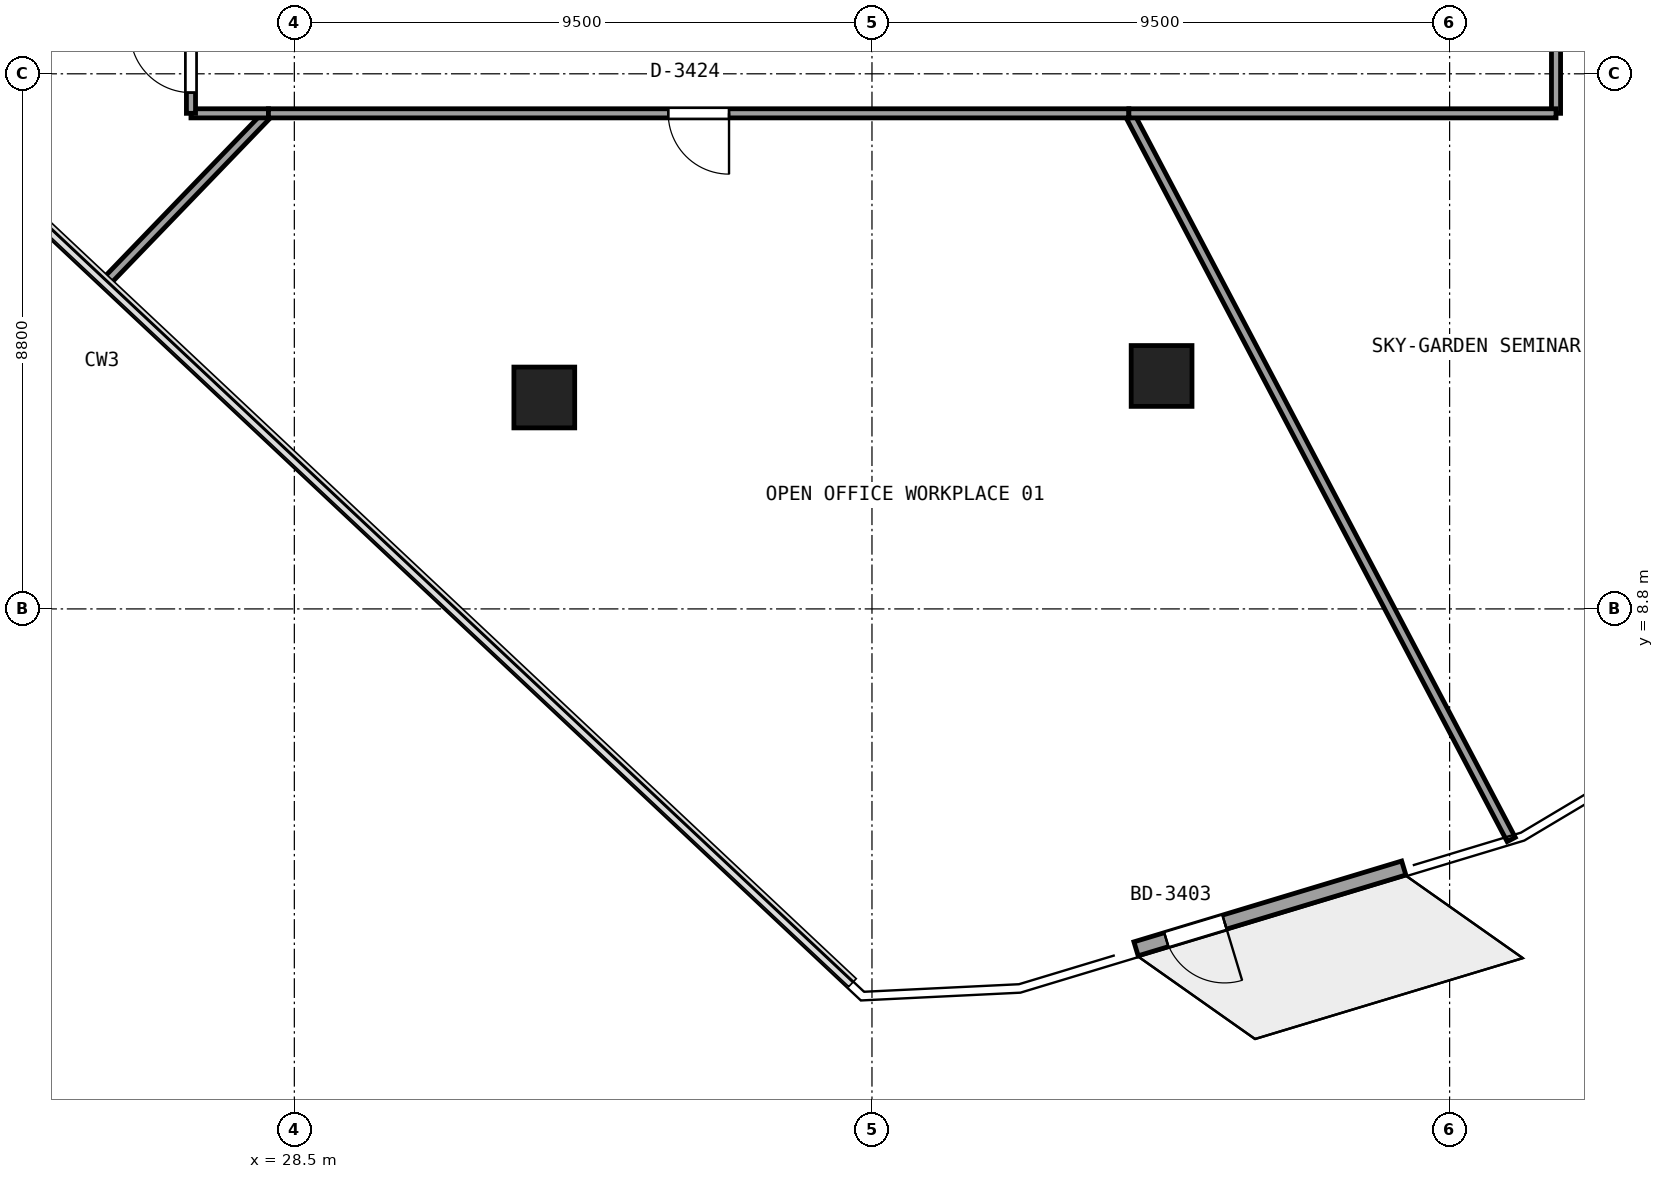
"""IFC4 building model, lengths in metres.
Left out: names, types, materials, properties, quantities, classifications, styles, units other than length and angle.
Written with IfcOpenShell. Run it as: python <this file> out.ifc"""

import sys

from ifc_helpers import new_model, si_unit, direction, frame, frame_2d, origin, origin_2d, place, context, subcontext, project, spatial, rectangle, extrude, element, fill, save


model = new_model("IFC4")
c1 = context("Model", 3, precision=1e-05, world=origin(), true_north=direction((0.0, 1.0)))
c2 = subcontext(c1, "Body", "Model", "MODEL_VIEW")
j1 = project(units=[si_unit("LENGTHUNIT", "METRE"), si_unit("PLANEANGLEUNIT", "RADIAN")], contexts=[c1])
p1 = place(None, origin())
s1 = spatial("IfcSite", under=j1, at=p1, CompositionType="ELEMENT")
p2 = place(p1, origin())
s2 = spatial("IfcBuilding", under=s1, at=p2, CompositionType="ELEMENT")
p3 = place(p2, frame((0.0, 0.0, 129.3)))
s3 = spatial("IfcBuildingStorey", under=s2, at=p3, CompositionType="ELEMENT", Elevation=129.3)
for number, where, z_axis, x_axis in (
    (1, (32.611, 12.277, 0.0), (0.0, 0.0, 1.0), (1.0, 0.0, 0.0)),
    (2, (42.763, 12.631, 0.0), (0.0, 0.0, 1.0), (1.0, 0.0, 0.0)),
):
    element("IfcColumn", number, at=place(p3, frame(where, z_axis=z_axis, x_axis=x_axis)), inside=s3, PredefinedType="COLUMN", context=c2, shape_type="SweptSolid", body=[
        extrude(rectangle(XDim=1.0, YDim=1.0, at=origin_2d()), origin(), (0.0, 0.0, 1.0), 3.32),
    ])
p4 = place(p3, frame((46.746, 4.539, 0.0), z_axis=(0.0, 0.0, 1.0), x_axis=(-0.957335469259, -0.288978890748, 0.0)))
e3 = element("IfcWall", 3, at=p4, inside=s3, PredefinedType="SOLIDWALL", context=c2, shape_type="SweptSolid", body=[
    extrude(rectangle(XDim=4.599, YDim=0.24, at=frame_2d((2.3, 0.0))), origin(), (0.0, 0.0, 1.0), 3.32),
])
p5 = place(p4, frame((3.079, 0.0, 0.0)))
e4 = element("IfcOpeningElement", 4, at=p5, cuts=e3, PredefinedType="OPENING", context=c2, shape_type="SweptSolid", body=[
    extrude(rectangle(XDim=1.0, YDim=2.15, at=frame_2d((0.5, 1.075))), frame((0.0, 0.13, 0.0), z_axis=(0.0, -1.0, 0.0), x_axis=(1.0, 0.0, 0.0)), (0.0, 0.0, 1.0), 0.26),
])
p6 = place(p3, frame((25.378, 14.152, 0.0), z_axis=(0.0, 0.0, 1.0), x_axis=(0.693884355372, 0.720086454094, 0.0)))
e5 = element("IfcWall", 5, at=p6, inside=s3, PredefinedType="PARTITIONING", context=c2, shape_type="SweptSolid", body=[
    extrude(rectangle(XDim=3.885, YDim=0.15, at=frame_2d((1.943, 0.0))), origin(), (0.0, 0.0, 1.0), 2.805),
])
p7 = place(p3, frame((28.074, 16.95, 0.0), z_axis=(0.0, 0.0, 1.0), x_axis=(-1.0, 0.0, 0.0)))
e6 = element("IfcWall", 6, at=p7, inside=s3, PredefinedType="PARTITIONING", context=c2, shape_type="SweptSolid", body=[
    extrude(rectangle(XDim=1.274, YDim=0.15, at=frame_2d((0.637, 0.0))), origin(), (0.0, 0.0, 1.0), 2.805),
])
p8 = place(p3, frame((26.8, 16.95, 0.0), z_axis=(0.0, 0.0, 1.0), x_axis=(0.0, 1.0, 0.0)))
e7 = element("IfcWall", 7, at=p8, inside=s3, PredefinedType="PARTITIONING", context=c2, shape_type="SweptSolid", body=[
    extrude(rectangle(XDim=1.95, YDim=0.15, at=frame_2d((0.975, 0.0))), origin(), (0.0, 0.0, 1.0), 2.805),
])
p9 = place(p8, frame((0.341, 0.0, 0.0)))
e8 = element("IfcOpeningElement", 8, at=p9, cuts=e7, PredefinedType="OPENING", context=c2, shape_type="SweptSolid", body=[
    extrude(rectangle(XDim=1.0, YDim=2.15, at=frame_2d((0.5, 1.075))), frame((0.0, 0.085, 0.0), z_axis=(0.0, -1.0, 0.0), x_axis=(1.0, 0.0, 0.0)), (0.0, 0.0, 1.0), 0.17),
])
p10 = place(p3, frame((48.513, 5.008, 0.0), z_axis=(0.0, 0.0, 1.0), x_axis=(-0.465899265879, 0.884837767082, 0.0)))
e9 = element("IfcWall", 9, at=p10, inside=s3, PredefinedType="PARTITIONING", context=c2, shape_type="SweptSolid", body=[
    extrude(rectangle(XDim=13.496, YDim=0.15, at=frame_2d((6.748, 0.0))), origin(), (0.0, 0.0, 1.0), 2.805),
])
p11 = place(p3, frame((42.225, 16.95, 0.0), z_axis=(0.0, 0.0, 1.0), x_axis=(-1.0, 0.0, 0.0)))
e10 = element("IfcWall", 10, at=p11, inside=s3, PredefinedType="PARTITIONING", context=c2, shape_type="SweptSolid", body=[
    extrude(rectangle(XDim=14.151, YDim=0.15, at=frame_2d((7.076, 0.0))), origin(), (0.0, 0.0, 1.0), 2.687),
])
p12 = place(p11, frame((6.576, 0.0, 0.0)))
e11 = element("IfcOpeningElement", 11, at=p12, cuts=e10, PredefinedType="OPENING", context=c2, shape_type="SweptSolid", body=[
    extrude(rectangle(XDim=1.0, YDim=2.15, at=frame_2d((0.5, 1.075))), frame((0.0, 0.085, 0.0), z_axis=(0.0, -1.0, 0.0), x_axis=(1.0, 0.0, 0.0)), (0.0, 0.0, 1.0), 0.17),
])
p13 = place(p3, frame((49.25, 18.6, 0.0), z_axis=(0.0, 0.0, 1.0), x_axis=(0.0, -1.0, 0.0)))
e12 = element("IfcWall", 12, at=p13, inside=s3, PredefinedType="PARTITIONING", context=c2, shape_type="SweptSolid", body=[
    extrude(rectangle(XDim=1.65, YDim=0.15, at=frame_2d((0.825, 0.0))), origin(), (0.0, 0.0, 1.0), 3.32),
])
p14 = place(p3, frame((49.25, 16.95, 0.0), z_axis=(0.0, 0.0, 1.0), x_axis=(-1.0, 0.0, 0.0)))
e13 = element("IfcWall", 13, at=p14, inside=s3, PredefinedType="PARTITIONING", context=c2, shape_type="SweptSolid", body=[
    extrude(rectangle(XDim=7.025, YDim=0.15, at=frame_2d((3.512, 0.0))), origin(), (0.0, 0.0, 1.0), 2.805),
])
p15 = place(p5, origin())
e14 = element("IfcDoor", 14, at=p15, inside=s3, OperationType="SINGLE_SWING_LEFT", PredefinedType="DOOR", context=c2, shape_type="SweptSolid", body=[
    extrude(rectangle(XDim=1.0, YDim=2.15, at=frame_2d((0.5, 1.075))), frame((0.0, 0.025, 0.0), z_axis=(0.0, -1.0, 0.0), x_axis=(1.0, 0.0, 0.0)), (0.0, 0.0, 1.0), 0.05),
])
fill(e4, e14)
p16 = place(p9, origin())
e15 = element("IfcDoor", 15, at=p16, inside=s3, OperationType="SINGLE_SWING_RIGHT", PredefinedType="DOOR", context=c2, shape_type="SweptSolid", body=[
    extrude(rectangle(XDim=1.0, YDim=2.15, at=frame_2d((0.5, 1.075))), frame((0.0, 0.025, 0.0), z_axis=(0.0, -1.0, 0.0), x_axis=(1.0, 0.0, 0.0)), (0.0, 0.0, 1.0), 0.05),
])
fill(e8, e15)
p17 = place(p12, origin())
e16 = element("IfcDoor", 16, at=p17, inside=s3, OperationType="SINGLE_SWING_LEFT", PredefinedType="DOOR", context=c2, shape_type="SweptSolid", body=[
    extrude(rectangle(XDim=1.0, YDim=2.15, at=frame_2d((0.5, 1.075))), frame((0.0, 0.025, 0.0), z_axis=(0.0, -1.0, 0.0), x_axis=(1.0, 0.0, 0.0)), (0.0, 0.0, 1.0), 0.05),
])
fill(e11, e16)
save(model, sys.argv[1])
